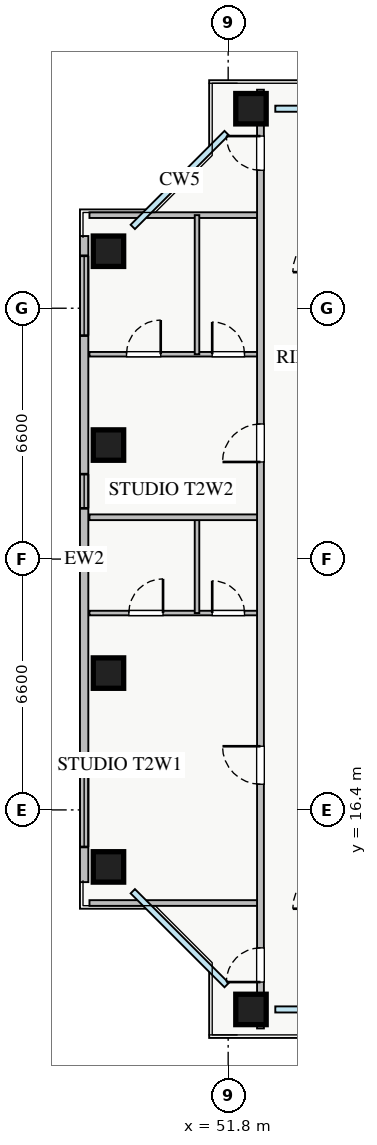
"""IFC4 building model, lengths in metres.
Left out: names, types, materials, properties, quantities, classifications, styles, units other than length and angle.
Written with IfcOpenShell. Run it as: python <this file> out.ifc"""

import sys

from ifc_helpers import new_model, si_unit, direction, frame, frame_2d, origin, origin_2d, place, context, subcontext, project, spatial, rectangle, extrude, source, transform, mapped, element, fill, save


model = new_model("IFC4")
c1 = context("Model", 3, precision=1e-05, world=origin(), true_north=direction((0.0, 1.0)))
c2 = subcontext(c1, "Body", "Model", "MODEL_VIEW")
j1 = project(units=[si_unit("LENGTHUNIT", "METRE"), si_unit("PLANEANGLEUNIT", "RADIAN")], contexts=[c1])
p1 = place(None, origin())
s1 = spatial("IfcSite", under=j1, at=p1, CompositionType="ELEMENT")
p2 = place(p1, origin())
s2 = spatial("IfcBuilding", under=s1, at=p2, CompositionType="ELEMENT")
p3 = place(p2, frame((0.0, 0.0, 76.25)))
s3 = spatial("IfcBuildingStorey", under=s2, at=p3, CompositionType="ELEMENT", Elevation=76.25)
m1 = source(origin(), c2, "Body", "SweptSolid", [
    extrude(rectangle(XDim=0.8, YDim=0.8, at=origin_2d()), origin(), (0.0, 0.0, 1.0), 3.25),
])
for number, where, z_axis, x_axis in (
    (1, (52.4, 11.15, 0.0), (0.0, 0.0, 1.0), (1.0, 0.0, 0.0)),
    (2, (52.4, 34.85, 0.0), (0.0, 0.0, 1.0), (1.0, 0.0, 0.0)),
    (3, (48.65, 14.9, 0.0), (0.0, 0.0, 1.0), (1.0, 0.0, 0.0)),
    (4, (48.65, 20.0, 0.0), (0.0, 0.0, 1.0), (1.0, 0.0, 0.0)),
    (5, (48.65, 26.0, 0.0), (0.0, 0.0, 1.0), (1.0, 0.0, 0.0)),
    (6, (48.65, 31.1, 0.0), (0.0, 0.0, 1.0), (1.0, 0.0, 0.0)),
):
    element("IfcColumn", number, at=place(p3, frame(where, z_axis=z_axis, x_axis=x_axis)), inside=s3, PredefinedType="COLUMN", context=c2, shape_type="MappedRepresentation", body=[
        mapped(m1, transform((0.0, 0.0, 0.0), x_axis=(1.0, 0.0, 0.0), y_axis=(0.0, 1.0, 0.0), z_axis=(0.0, 0.0, 1.0), scale=1.0)),
    ])
p4 = place(p3, frame((48.01, 14.5, 0.0), z_axis=(0.0, 0.0, 1.0), x_axis=(0.0, 1.0, 0.0)))
e7 = element("IfcWall", 7, at=p4, inside=s3, PredefinedType="STANDARD", context=c2, shape_type="SweptSolid", body=[
    extrude(rectangle(XDim=17.0, YDim=0.22, at=frame_2d((8.5, 0.0))), origin(), (0.0, 0.0, 1.0), 2.61),
])
p5 = place(p4, frame((0.925, 0.0, 0.9)))
e8 = element("IfcOpeningElement", 8, at=p5, cuts=e7, PredefinedType="OPENING", context=c2, shape_type="SweptSolid", body=[
    extrude(rectangle(XDim=2.4, YDim=1.48, at=frame_2d((1.2, 0.74))), frame((0.0, 0.12, 0.0), z_axis=(0.0, -1.0, 0.0), x_axis=(1.0, 0.0, 0.0)), (0.0, 0.0, 1.0), 0.24),
])
p6 = place(p4, frame((14.38, 0.0, 0.9)))
e9 = element("IfcOpeningElement", 9, at=p6, cuts=e7, PredefinedType="OPENING", context=c2, shape_type="SweptSolid", body=[
    extrude(rectangle(XDim=2.1, YDim=1.5, at=frame_2d((1.05, 0.75))), frame((0.0, 0.12, 0.0), z_axis=(0.0, -1.0, 0.0), x_axis=(1.0, 0.0, 0.0)), (0.0, 0.0, 1.0), 0.24),
])
p7 = place(p4, frame((9.835, 0.0, 0.9)))
e10 = element("IfcOpeningElement", 10, at=p7, cuts=e7, PredefinedType="OPENING", context=c2, shape_type="SweptSolid", body=[
    extrude(rectangle(XDim=0.9, YDim=1.2, at=frame_2d((0.45, 0.6))), frame((0.0, 0.12, 0.0), z_axis=(0.0, -1.0, 0.0), x_axis=(1.0, 0.0, 0.0)), (0.0, 0.0, 1.0), 0.24),
])
for number, where, z_axis, x_axis in (
    (11, (48.15, 32.05, 0.0), (0.0, 0.0, 1.0), (1.0, 0.0, 0.0)),
    (12, (48.15, 13.95, 0.0), (0.0, 0.0, 1.0), (1.0, 0.0, 0.0)),
):
    element("IfcWall", number, at=place(p3, frame(where, z_axis=z_axis, x_axis=x_axis)), inside=s3, PredefinedType="PARTITIONING", context=c2, shape_type="SweptSolid", body=[
        extrude(rectangle(XDim=4.5, YDim=0.15, at=frame_2d((2.25, 0.0))), origin(), (0.0, 0.0, 1.0), 3.07),
    ])
p8 = place(p3, frame((48.15, 21.58, 0.0), z_axis=(0.0, 0.0, 1.0), x_axis=(1.0, 0.0, 0.0)))
e13 = element("IfcWall", 13, at=p8, inside=s3, PredefinedType="PLUMBINGWALL", context=c2, shape_type="SweptSolid", body=[
    extrude(rectangle(XDim=4.5, YDim=0.12, at=frame_2d((2.25, 0.0))), origin(), (0.0, 0.0, 1.0), 3.07),
])
p9 = place(p8, frame((1.036, 0.0, 0.0)))
e14 = element("IfcOpeningElement", 14, at=p9, cuts=e13, PredefinedType="OPENING", context=c2, shape_type="SweptSolid", body=[
    extrude(rectangle(XDim=0.9, YDim=2.05, at=frame_2d((0.45, 1.025))), frame((0.0, 0.07, 0.0), z_axis=(0.0, -1.0, 0.0), x_axis=(1.0, 0.0, 0.0)), (0.0, 0.0, 1.0), 0.14),
])
p10 = place(p8, frame((3.23, 0.0, 0.0)))
e15 = element("IfcOpeningElement", 15, at=p10, cuts=e13, PredefinedType="OPENING", context=c2, shape_type="SweptSolid", body=[
    extrude(rectangle(XDim=0.85, YDim=2.05, at=frame_2d((0.425, 1.025))), frame((0.0, 0.07, 0.0), z_axis=(0.0, -1.0, 0.0), x_axis=(1.0, 0.0, 0.0)), (0.0, 0.0, 1.0), 0.14),
])
p11 = place(p3, frame((50.98, 21.58, 0.0), z_axis=(0.0, 0.0, 1.0), x_axis=(0.0, 1.0, 0.0)))
e16 = element("IfcWall", 16, at=p11, inside=s3, PredefinedType="PLUMBINGWALL", context=c2, shape_type="SweptSolid", body=[
    extrude(rectangle(XDim=2.52, YDim=0.12, at=frame_2d((1.26, 0.0))), origin(), (0.0, 0.0, 1.0), 3.07),
])
p12 = place(p3, frame((48.15, 28.39, 0.0), z_axis=(0.0, 0.0, 1.0), x_axis=(1.0, 0.0, 0.0)))
e17 = element("IfcWall", 17, at=p12, inside=s3, PredefinedType="PLUMBINGWALL", context=c2, shape_type="SweptSolid", body=[
    extrude(rectangle(XDim=4.5, YDim=0.12, at=frame_2d((2.25, 0.0))), origin(), (0.0, 0.0, 1.0), 3.07),
])
p13 = place(p12, frame((0.975, 0.0, 0.0)))
e18 = element("IfcOpeningElement", 18, at=p13, cuts=e17, PredefinedType="OPENING", context=c2, shape_type="SweptSolid", body=[
    extrude(rectangle(XDim=0.9, YDim=2.05, at=frame_2d((0.45, 1.025))), frame((0.0, 0.07, 0.0), z_axis=(0.0, -1.0, 0.0), x_axis=(1.0, 0.0, 0.0)), (0.0, 0.0, 1.0), 0.14),
])
p14 = place(p12, frame((3.23, 0.0, 0.0)))
e19 = element("IfcOpeningElement", 19, at=p14, cuts=e17, PredefinedType="OPENING", context=c2, shape_type="SweptSolid", body=[
    extrude(rectangle(XDim=0.85, YDim=2.05, at=frame_2d((0.425, 1.025))), frame((0.0, 0.07, 0.0), z_axis=(0.0, -1.0, 0.0), x_axis=(1.0, 0.0, 0.0)), (0.0, 0.0, 1.0), 0.14),
])
p15 = place(p3, frame((50.98, 28.39, 0.0), z_axis=(0.0, 0.0, 1.0), x_axis=(0.0, 1.0, 0.0)))
e20 = element("IfcWall", 20, at=p15, inside=s3, PredefinedType="PLUMBINGWALL", context=c2, shape_type="SweptSolid", body=[
    extrude(rectangle(XDim=3.66, YDim=0.12, at=frame_2d((1.83, 0.0))), origin(), (0.0, 0.0, 1.0), 3.07),
])
p16 = place(p3, frame((48.15, 24.1, 0.0), z_axis=(0.0, 0.0, 1.0), x_axis=(1.0, 0.0, 0.0)))
e21 = element("IfcWall", 21, at=p16, inside=s3, PredefinedType="PARTITIONING", context=c2, shape_type="SweptSolid", body=[
    extrude(rectangle(XDim=4.5, YDim=0.15, at=frame_2d((2.25, 0.0))), origin(), (0.0, 0.0, 1.0), 3.07),
])
p17 = place(p3, frame((52.65, 10.65, 0.0), z_axis=(0.0, 0.0, 1.0), x_axis=(0.0, 1.0, 0.0)))
e22 = element("IfcWall", 22, at=p17, inside=s3, PredefinedType="PARTITIONING", context=c2, shape_type="SweptSolid", body=[
    extrude(rectangle(XDim=24.7, YDim=0.18, at=frame_2d((12.35, 0.0))), origin(), (0.0, 0.0, 1.0), 2.615),
])
p18 = place(p17, frame((22.58, 0.0, 0.0)))
e23 = element("IfcOpeningElement", 23, at=p18, cuts=e22, PredefinedType="OPENING", context=c2, shape_type="SweptSolid", body=[
    extrude(rectangle(XDim=0.9, YDim=2.05, at=frame_2d((0.45, 1.025))), frame((0.0, 0.1, 0.0), z_axis=(0.0, -1.0, 0.0), x_axis=(1.0, 0.0, 0.0)), (0.0, 0.0, 1.0), 0.2),
])
p19 = place(p17, frame((1.22, 0.0, 0.0)))
e24 = element("IfcOpeningElement", 24, at=p19, cuts=e22, PredefinedType="OPENING", context=c2, shape_type="SweptSolid", body=[
    extrude(rectangle(XDim=0.9, YDim=2.05, at=frame_2d((0.45, 1.025))), frame((0.0, 0.1, 0.0), z_axis=(0.0, -1.0, 0.0), x_axis=(1.0, 0.0, 0.0)), (0.0, 0.0, 1.0), 0.2),
])
p20 = place(p17, frame((6.425, 0.0, 0.0)))
e25 = element("IfcOpeningElement", 25, at=p20, cuts=e22, PredefinedType="OPENING", context=c2, shape_type="SweptSolid", body=[
    extrude(rectangle(XDim=1.0, YDim=2.05, at=frame_2d((0.5, 1.025))), frame((0.0, 0.1, 0.0), z_axis=(0.0, -1.0, 0.0), x_axis=(1.0, 0.0, 0.0)), (0.0, 0.0, 1.0), 0.2),
])
p21 = place(p17, frame((14.905, 0.0, 0.0)))
e26 = element("IfcOpeningElement", 26, at=p21, cuts=e22, PredefinedType="OPENING", context=c2, shape_type="SweptSolid", body=[
    extrude(rectangle(XDim=1.0, YDim=2.05, at=frame_2d((0.5, 1.025))), frame((0.0, 0.1, 0.0), z_axis=(0.0, -1.0, 0.0), x_axis=(1.0, 0.0, 0.0)), (0.0, 0.0, 1.0), 0.2),
])
m2 = source(origin(), c2, "Body", "SweptSolid", [
    extrude(rectangle(XDim=2.4, YDim=1.48, at=frame_2d((1.2, 0.74))), frame((0.0, 0.03, 0.0), z_axis=(0.0, -1.0, 0.0), x_axis=(1.0, 0.0, 0.0)), (0.0, 0.0, 1.0), 0.06),
])
p22 = place(p5, origin())
e27 = element("IfcWindow", 27, at=p22, inside=s3, PartitioningType="TRIPLE_PANEL_VERTICAL", PredefinedType="WINDOW", context=c2, shape_type="MappedRepresentation", body=[
    mapped(m2, transform((0.0, 0.0, 0.0), x_axis=(1.0, 0.0, 0.0), y_axis=(0.0, 1.0, 0.0), z_axis=(0.0, 0.0, 1.0), scale=1.0)),
])
fill(e8, e27)
m3 = source(origin(), c2, "Body", "SweptSolid", [
    extrude(rectangle(XDim=2.1, YDim=1.5, at=frame_2d((1.05, 0.75))), frame((0.0, 0.03, 0.0), z_axis=(0.0, -1.0, 0.0), x_axis=(1.0, 0.0, 0.0)), (0.0, 0.0, 1.0), 0.06),
])
p23 = place(p6, origin())
e28 = element("IfcWindow", 28, at=p23, inside=s3, PartitioningType="TRIPLE_PANEL_VERTICAL", PredefinedType="WINDOW", context=c2, shape_type="MappedRepresentation", body=[
    mapped(m3, transform((0.0, 0.0, 0.0), x_axis=(1.0, 0.0, 0.0), y_axis=(0.0, 1.0, 0.0), z_axis=(0.0, 0.0, 1.0), scale=1.0)),
])
fill(e9, e28)
m4 = source(origin(), c2, "Body", "SweptSolid", [
    extrude(rectangle(XDim=0.9, YDim=2.05, at=frame_2d((0.45, 1.025))), frame((0.0, 0.025, 0.0), z_axis=(0.0, -1.0, 0.0), x_axis=(1.0, 0.0, 0.0)), (0.0, 0.0, 1.0), 0.05),
])
p24 = place(p9, origin())
e29 = element("IfcDoor", 29, at=p24, inside=s3, OperationType="SINGLE_SWING_RIGHT", PredefinedType="DOOR", context=c2, shape_type="MappedRepresentation", body=[
    mapped(m4, transform((0.0, 0.0, 0.0), x_axis=(1.0, 0.0, 0.0), y_axis=(0.0, 1.0, 0.0), z_axis=(0.0, 0.0, 1.0), scale=1.0)),
])
fill(e14, e29)
m5 = source(origin(), c2, "Body", "SweptSolid", [
    extrude(rectangle(XDim=0.85, YDim=2.05, at=frame_2d((0.425, 1.025))), frame((0.0, 0.025, 0.0), z_axis=(0.0, -1.0, 0.0), x_axis=(1.0, 0.0, 0.0)), (0.0, 0.0, 1.0), 0.05),
])
p25 = place(p10, origin())
e30 = element("IfcDoor", 30, at=p25, inside=s3, OperationType="SINGLE_SWING_LEFT", PredefinedType="DOOR", context=c2, shape_type="MappedRepresentation", body=[
    mapped(m5, transform((0.0, 0.0, 0.0), x_axis=(1.0, 0.0, 0.0), y_axis=(0.0, 1.0, 0.0), z_axis=(0.0, 0.0, 1.0), scale=1.0)),
])
fill(e15, e30)
p26 = place(p13, origin())
e31 = element("IfcDoor", 31, at=p26, inside=s3, OperationType="SINGLE_SWING_RIGHT", PredefinedType="DOOR", context=c2, shape_type="MappedRepresentation", body=[
    mapped(m4, transform((0.0, 0.0, 0.0), x_axis=(1.0, 0.0, 0.0), y_axis=(0.0, 1.0, 0.0), z_axis=(0.0, 0.0, 1.0), scale=1.0)),
])
fill(e18, e31)
p27 = place(p14, origin())
e32 = element("IfcDoor", 32, at=p27, inside=s3, OperationType="SINGLE_SWING_LEFT", PredefinedType="DOOR", context=c2, shape_type="MappedRepresentation", body=[
    mapped(m5, transform((0.0, 0.0, 0.0), x_axis=(1.0, 0.0, 0.0), y_axis=(0.0, 1.0, 0.0), z_axis=(0.0, 0.0, 1.0), scale=1.0)),
])
fill(e19, e32)
p28 = place(p18, origin())
e33 = element("IfcDoor", 33, at=p28, inside=s3, OperationType="SINGLE_SWING_RIGHT", PredefinedType="DOOR", context=c2, shape_type="MappedRepresentation", body=[
    mapped(m4, transform((0.0, 0.0, 0.0), x_axis=(1.0, 0.0, 0.0), y_axis=(0.0, 1.0, 0.0), z_axis=(0.0, 0.0, 1.0), scale=1.0)),
])
fill(e23, e33)
p29 = place(p19, origin())
e34 = element("IfcDoor", 34, at=p29, inside=s3, OperationType="SINGLE_SWING_LEFT", PredefinedType="DOOR", context=c2, shape_type="MappedRepresentation", body=[
    mapped(m4, transform((0.0, 0.0, 0.0), x_axis=(1.0, 0.0, 0.0), y_axis=(0.0, 1.0, 0.0), z_axis=(0.0, 0.0, 1.0), scale=1.0)),
])
fill(e24, e34)
m6 = source(origin(), c2, "Body", "SweptSolid", [
    extrude(rectangle(XDim=1.0, YDim=2.05, at=frame_2d((0.5, 1.025))), frame((0.0, 0.025, 0.0), z_axis=(0.0, -1.0, 0.0), x_axis=(1.0, 0.0, 0.0)), (0.0, 0.0, 1.0), 0.05),
])
p30 = place(p20, origin())
e35 = element("IfcDoor", 35, at=p30, inside=s3, OperationType="SINGLE_SWING_RIGHT", PredefinedType="DOOR", context=c2, shape_type="MappedRepresentation", body=[
    mapped(m6, transform((0.0, 0.0, 0.0), x_axis=(1.0, 0.0, 0.0), y_axis=(0.0, 1.0, 0.0), z_axis=(0.0, 0.0, 1.0), scale=1.0)),
])
fill(e25, e35)
p31 = place(p21, origin())
e36 = element("IfcDoor", 36, at=p31, inside=s3, OperationType="SINGLE_SWING_LEFT", PredefinedType="DOOR", context=c2, shape_type="MappedRepresentation", body=[
    mapped(m6, transform((0.0, 0.0, 0.0), x_axis=(1.0, 0.0, 0.0), y_axis=(0.0, 1.0, 0.0), z_axis=(0.0, 0.0, 1.0), scale=1.0)),
])
fill(e26, e36)
m7 = source(origin(), c2, "Body", "SweptSolid", [
    extrude(rectangle(XDim=0.9, YDim=1.2, at=frame_2d((0.45, 0.6))), frame((0.0, 0.03, 0.0), z_axis=(0.0, -1.0, 0.0), x_axis=(1.0, 0.0, 0.0)), (0.0, 0.0, 1.0), 0.06),
])
p32 = place(p7, origin())
e37 = element("IfcWindow", 37, at=p32, inside=s3, PartitioningType="SINGLE_PANEL", PredefinedType="WINDOW", context=c2, shape_type="MappedRepresentation", body=[
    mapped(m7, transform((0.0, 0.0, 0.0), x_axis=(1.0, 0.0, 0.0), y_axis=(0.0, 1.0, 0.0), z_axis=(0.0, 0.0, 1.0), scale=1.0)),
])
fill(e10, e37)
save(model, sys.argv[1])
